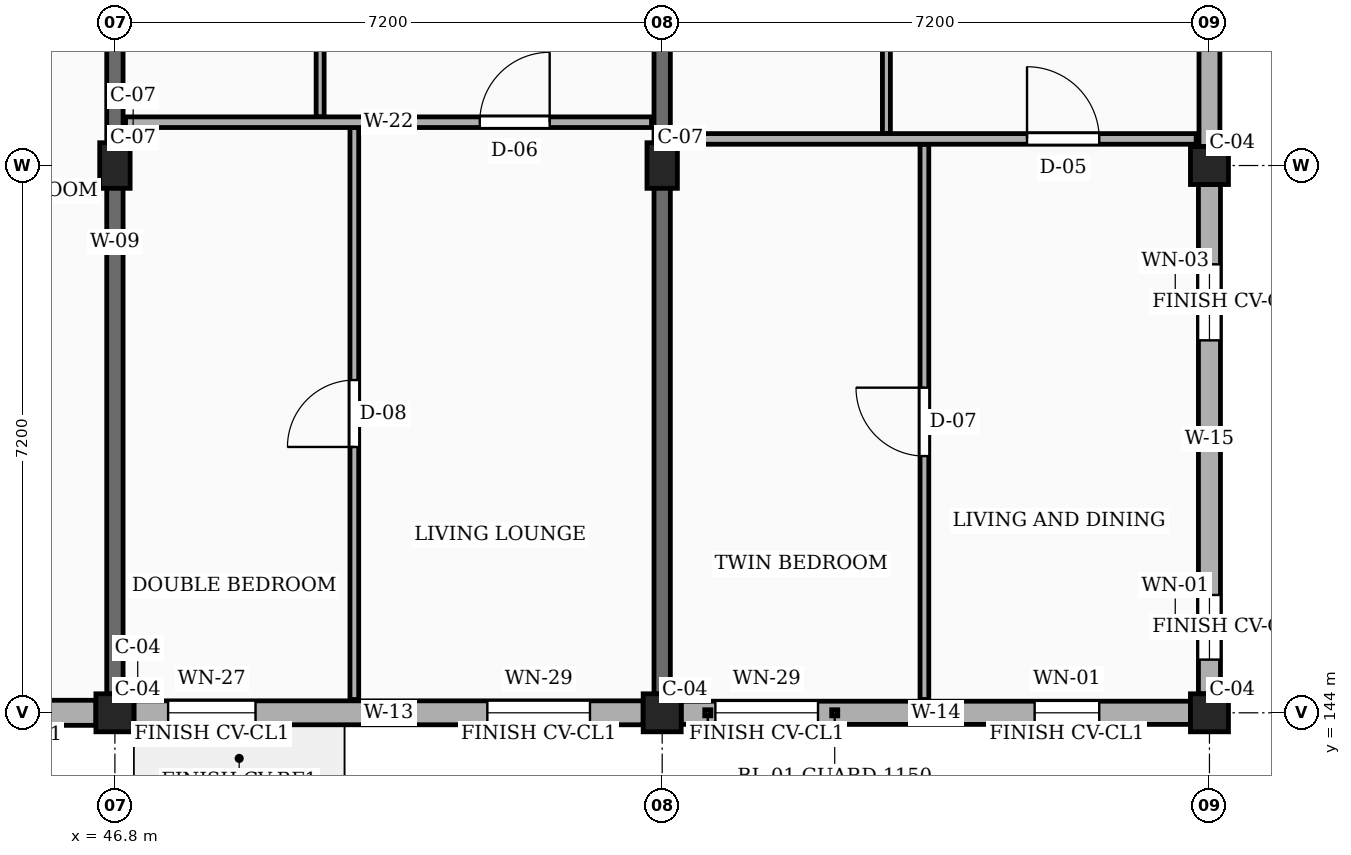
"""IFC4 building model, lengths in metres.
Left out: names, types, materials, properties, quantities, classifications, styles, units other than length and angle.
Written with IfcOpenShell. Run it as: python <this file> out.ifc"""

import sys

from ifc_helpers import new_model, si_unit, direction, frame, frame_2d, origin, origin_2d, place, context, subcontext, project, spatial, rectangle, extrude, element, fill, save


model = new_model("IFC4")
c1 = context("Model", 3, precision=1e-05, world=origin(), true_north=direction((0.0, 1.0)))
c2 = subcontext(c1, "Body", "Model", "MODEL_VIEW")
j1 = project(units=[si_unit("LENGTHUNIT", "METRE"), si_unit("PLANEANGLEUNIT", "RADIAN")], contexts=[c1])
p1 = place(None, origin())
s1 = spatial("IfcSite", under=j1, at=p1, CompositionType="ELEMENT")
p2 = place(p1, origin())
s2 = spatial("IfcBuilding", under=s1, at=p2, CompositionType="ELEMENT")
p3 = place(p2, frame((0.0, 0.0, 32.85)))
s3 = spatial("IfcBuildingStorey", under=s2, at=p3, CompositionType="ELEMENT", Elevation=32.85)
p4 = place(p3, frame((46.8, 144.0, 0.0), z_axis=(0.0, 0.0, 1.0), x_axis=(1.0, 0.0, 0.0)))
e1 = element("IfcColumn", 1, at=p4, inside=s3, PredefinedType="COLUMN", context=c2, shape_type="SweptSolid", body=[
    extrude(rectangle(XDim=0.5, YDim=0.5, at=origin_2d()), origin(), (0.0, 0.0, 1.0), 3.15),
])
p5 = place(p3, frame((46.8, 151.2, 0.0), z_axis=(0.0, 0.0, 1.0), x_axis=(1.0, 0.0, 0.0)))
e2 = element("IfcColumn", 2, at=p5, inside=s3, PredefinedType="COLUMN", context=c2, shape_type="SweptSolid", body=[
    extrude(rectangle(XDim=0.4, YDim=0.6, at=origin_2d()), origin(), (0.0, 0.0, 1.0), 3.15),
])
p6 = place(p3, frame((54.0, 144.0, 0.0), z_axis=(0.0, 0.0, 1.0), x_axis=(1.0, 0.0, 0.0)))
e3 = element("IfcColumn", 3, at=p6, inside=s3, PredefinedType="COLUMN", context=c2, shape_type="SweptSolid", body=[
    extrude(rectangle(XDim=0.5, YDim=0.5, at=origin_2d()), origin(), (0.0, 0.0, 1.0), 3.15),
])
p7 = place(p3, frame((54.0, 151.2, 0.0), z_axis=(0.0, 0.0, 1.0), x_axis=(1.0, 0.0, 0.0)))
e4 = element("IfcColumn", 4, at=p7, inside=s3, PredefinedType="COLUMN", context=c2, shape_type="SweptSolid", body=[
    extrude(rectangle(XDim=0.4, YDim=0.6, at=origin_2d()), origin(), (0.0, 0.0, 1.0), 3.15),
])
for number, where, z_axis, x_axis in (
    (5, (61.2, 144.0, 0.0), (0.0, 0.0, 1.0), (1.0, 0.0, 0.0)),
    (6, (61.2, 151.2, 0.0), (0.0, 0.0, 1.0), (1.0, 0.0, 0.0)),
):
    element("IfcColumn", number, at=place(p3, frame(where, z_axis=z_axis, x_axis=x_axis)), inside=s3, PredefinedType="COLUMN", context=c2, shape_type="SweptSolid", body=[
        extrude(rectangle(XDim=0.5, YDim=0.5, at=origin_2d()), origin(), (0.0, 0.0, 1.0), 3.15),
    ])
for number, where, z_axis, x_axis in (
    (7, (46.8, 144.25, 0.0), (0.0, 0.0, 1.0), (0.0, 1.0, 0.0)),
    (8, (54.0, 144.25, 0.0), (0.0, 0.0, 1.0), (0.0, 1.0, 0.0)),
):
    element("IfcWall", number, at=place(p3, frame(where, z_axis=z_axis, x_axis=x_axis)), inside=s3, PredefinedType="SOLIDWALL", context=c2, shape_type="SweptSolid", body=[
        extrude(rectangle(XDim=11.9, YDim=0.215, at=frame_2d((5.95, 0.0))), origin(), (0.0, 0.0, 1.0), 2.185),
    ])
p8 = place(p3, frame((39.85, 144.0, 0.0), z_axis=(0.0, 0.0, 1.0), x_axis=(1.0, 0.0, 0.0)))
e9 = element("IfcWall", 9, at=p8, inside=s3, PredefinedType="SOLIDWALL", context=c2, shape_type="SweptSolid", body=[
    extrude(rectangle(XDim=6.7, YDim=0.33, at=frame_2d((3.35, 0.0))), origin(), (0.0, 0.0, 1.0), 2.455),
])
p9 = place(p8, frame((0.45, 0.0, 0.78)))
e10 = element("IfcOpeningElement", 10, at=p9, cuts=e9, PredefinedType="OPENING", context=c2, shape_type="SweptSolid", body=[
    extrude(rectangle(XDim=0.94, YDim=1.44, at=frame_2d((0.47, 0.72))), frame((0.0, 0.175, 0.0), z_axis=(0.0, -1.0, 0.0), x_axis=(1.0, 0.0, 0.0)), (0.0, 0.0, 1.0), 0.35),
])
p10 = place(p8, frame((4.65, 0.0, 0.78)))
e11 = element("IfcOpeningElement", 11, at=p10, cuts=e9, PredefinedType="OPENING", context=c2, shape_type="SweptSolid", body=[
    extrude(rectangle(XDim=1.15, YDim=1.44, at=frame_2d((0.575, 0.72))), frame((0.0, 0.175, 0.0), z_axis=(0.0, -1.0, 0.0), x_axis=(1.0, 0.0, 0.0)), (0.0, 0.0, 1.0), 0.35),
])
p11 = place(p3, frame((47.05, 144.0, 0.0), z_axis=(0.0, 0.0, 1.0), x_axis=(1.0, 0.0, 0.0)))
e12 = element("IfcWall", 12, at=p11, inside=s3, PredefinedType="SOLIDWALL", context=c2, shape_type="SweptSolid", body=[
    extrude(rectangle(XDim=6.7, YDim=0.315, at=frame_2d((3.35, 0.0))), origin(), (0.0, 0.0, 1.0), 2.455),
])
p12 = place(p11, frame((0.45, 0.0, 0.78)))
e13 = element("IfcOpeningElement", 13, at=p12, cuts=e12, PredefinedType="OPENING", context=c2, shape_type="SweptSolid", body=[
    extrude(rectangle(XDim=1.15, YDim=1.44, at=frame_2d((0.575, 0.72))), frame((0.0, 0.167, 0.0), z_axis=(0.0, -1.0, 0.0), x_axis=(1.0, 0.0, 0.0)), (0.0, 0.0, 1.0), 0.335),
])
p13 = place(p11, frame((4.65, 0.0, 0.78)))
e14 = element("IfcOpeningElement", 14, at=p13, cuts=e12, PredefinedType="OPENING", context=c2, shape_type="SweptSolid", body=[
    extrude(rectangle(XDim=1.35, YDim=1.44, at=frame_2d((0.675, 0.72))), frame((0.0, 0.167, 0.0), z_axis=(0.0, -1.0, 0.0), x_axis=(1.0, 0.0, 0.0)), (0.0, 0.0, 1.0), 0.335),
])
p14 = place(p3, frame((54.25, 144.0, 0.0), z_axis=(0.0, 0.0, 1.0), x_axis=(1.0, 0.0, 0.0)))
e15 = element("IfcWall", 15, at=p14, inside=s3, PredefinedType="SOLIDWALL", context=c2, shape_type="SweptSolid", body=[
    extrude(rectangle(XDim=6.7, YDim=0.305, at=frame_2d((3.35, 0.0))), origin(), (0.0, 0.0, 1.0), 2.455),
])
p15 = place(p14, frame((0.45, 0.0, 0.78)))
e16 = element("IfcOpeningElement", 16, at=p15, cuts=e15, PredefinedType="OPENING", context=c2, shape_type="SweptSolid", body=[
    extrude(rectangle(XDim=1.35, YDim=1.44, at=frame_2d((0.675, 0.72))), frame((0.0, 0.163, 0.0), z_axis=(0.0, -1.0, 0.0), x_axis=(1.0, 0.0, 0.0)), (0.0, 0.0, 1.0), 0.325),
])
p16 = place(p14, frame((4.65, 0.0, 0.78)))
e17 = element("IfcOpeningElement", 17, at=p16, cuts=e15, PredefinedType="OPENING", context=c2, shape_type="SweptSolid", body=[
    extrude(rectangle(XDim=0.85, YDim=1.15, at=frame_2d((0.425, 0.575))), frame((0.0, 0.163, 0.0), z_axis=(0.0, -1.0, 0.0), x_axis=(1.0, 0.0, 0.0)), (0.0, 0.0, 1.0), 0.325),
])
p17 = place(p3, frame((61.2, 144.25, 0.0), z_axis=(0.0, 0.0, 1.0), x_axis=(0.0, 1.0, 0.0)))
e18 = element("IfcWall", 18, at=p17, inside=s3, PredefinedType="SOLIDWALL", context=c2, shape_type="SweptSolid", body=[
    extrude(rectangle(XDim=6.7, YDim=0.29, at=frame_2d((3.35, 0.0))), origin(), (0.0, 0.0, 1.0), 2.455),
])
p18 = place(p17, frame((0.45, 0.0, 0.78)))
e19 = element("IfcOpeningElement", 19, at=p18, cuts=e18, PredefinedType="OPENING", context=c2, shape_type="SweptSolid", body=[
    extrude(rectangle(XDim=0.85, YDim=1.15, at=frame_2d((0.425, 0.575))), frame((0.0, 0.155, 0.0), z_axis=(0.0, -1.0, 0.0), x_axis=(1.0, 0.0, 0.0)), (0.0, 0.0, 1.0), 0.31),
])
p19 = place(p17, frame((4.65, 0.0, 0.78)))
e20 = element("IfcOpeningElement", 20, at=p19, cuts=e18, PredefinedType="OPENING", context=c2, shape_type="SweptSolid", body=[
    extrude(rectangle(XDim=1.0, YDim=1.15, at=frame_2d((0.5, 0.575))), frame((0.0, 0.155, 0.0), z_axis=(0.0, -1.0, 0.0), x_axis=(1.0, 0.0, 0.0)), (0.0, 0.0, 1.0), 0.31),
])
p20 = place(p3, frame((61.2, 151.45, 0.0), z_axis=(0.0, 0.0, 1.0), x_axis=(0.0, 1.0, 0.0)))
e21 = element("IfcWall", 21, at=p20, inside=s3, PredefinedType="SOLIDWALL", context=c2, shape_type="SweptSolid", body=[
    extrude(rectangle(XDim=6.7, YDim=0.275, at=frame_2d((3.35, 0.0))), origin(), (0.0, 0.0, 1.0), 2.455),
])
p21 = place(p20, frame((1.995, 0.0, 0.78)))
e22 = element("IfcOpeningElement", 22, at=p21, cuts=e21, PredefinedType="OPENING", context=c2, shape_type="SweptSolid", body=[
    extrude(rectangle(XDim=1.0, YDim=1.15, at=frame_2d((0.5, 0.575))), frame((0.0, 0.147, 0.0), z_axis=(0.0, -1.0, 0.0), x_axis=(1.0, 0.0, 0.0)), (0.0, 0.0, 1.0), 0.295),
])
p22 = place(p20, frame((5.125, 0.0, 0.78)))
e23 = element("IfcOpeningElement", 23, at=p22, cuts=e21, PredefinedType="OPENING", context=c2, shape_type="SweptSolid", body=[
    extrude(rectangle(XDim=1.16, YDim=1.15, at=frame_2d((0.58, 0.575))), frame((0.0, 0.147, 0.0), z_axis=(0.0, -1.0, 0.0), x_axis=(1.0, 0.0, 0.0)), (0.0, 0.0, 1.0), 0.295),
])
p23 = place(p3, frame((49.95, 144.175, 0.0), z_axis=(0.0, 0.0, 1.0), x_axis=(0.0, 1.0, 0.0)))
e24 = element("IfcWall", 24, at=p23, inside=s3, PredefinedType="PARTITIONING", context=c2, shape_type="SweptSolid", body=[
    extrude(rectangle(XDim=7.525, YDim=0.115, at=frame_2d((3.762, 0.0))), origin(), (0.0, 0.0, 1.0), 2.32),
])
p24 = place(p23, frame((3.323, 0.0, 0.0)))
e25 = element("IfcOpeningElement", 25, at=p24, cuts=e24, PredefinedType="OPENING", context=c2, shape_type="SweptSolid", body=[
    extrude(rectangle(XDim=0.88, YDim=2.08, at=frame_2d((0.44, 1.04))), frame((0.0, 0.067, 0.0), z_axis=(0.0, -1.0, 0.0), x_axis=(1.0, 0.0, 0.0)), (0.0, 0.0, 1.0), 0.135),
])
p25 = place(p3, frame((49.5, 151.84, 0.0), z_axis=(0.0, 0.0, 1.0), x_axis=(0.0, 1.0, 0.0)))
e26 = element("IfcWall", 26, at=p25, inside=s3, PredefinedType="PARTITIONING", context=c2, shape_type="SweptSolid", body=[
    extrude(rectangle(XDim=4.37, YDim=0.105, at=frame_2d((2.185, 0.0))), origin(), (0.0, 0.0, 1.0), 2.32),
])
p26 = place(p25, frame((1.75, 0.0, 0.0)))
e27 = element("IfcOpeningElement", 27, at=p26, cuts=e26, PredefinedType="OPENING", context=c2, shape_type="SweptSolid", body=[
    extrude(rectangle(XDim=0.87, YDim=2.05, at=frame_2d((0.435, 1.025))), frame((0.0, 0.062, 0.0), z_axis=(0.0, -1.0, 0.0), x_axis=(1.0, 0.0, 0.0)), (0.0, 0.0, 1.0), 0.125),
])
p27 = place(p3, frame((46.94, 151.77, 0.0), z_axis=(0.0, 0.0, 1.0), x_axis=(1.0, 0.0, 0.0)))
e28 = element("IfcWall", 28, at=p27, inside=s3, PredefinedType="PARTITIONING", context=c2, shape_type="SweptSolid", body=[
    extrude(rectangle(XDim=6.92, YDim=0.14, at=frame_2d((3.46, 0.0))), origin(), (0.0, 0.0, 1.0), 2.32),
])
p28 = place(p27, frame((4.66, 0.0, 0.0)))
e29 = element("IfcOpeningElement", 29, at=p28, cuts=e28, PredefinedType="OPENING", context=c2, shape_type="SweptSolid", body=[
    extrude(rectangle(XDim=0.92, YDim=2.1, at=frame_2d((0.46, 1.05))), frame((0.0, 0.08, 0.0), z_axis=(0.0, -1.0, 0.0), x_axis=(1.0, 0.0, 0.0)), (0.0, 0.0, 1.0), 0.16),
])
p29 = place(p3, frame((57.45, 144.175, 0.0), z_axis=(0.0, 0.0, 1.0), x_axis=(0.0, 1.0, 0.0)))
e30 = element("IfcWall", 30, at=p29, inside=s3, PredefinedType="PARTITIONING", context=c2, shape_type="SweptSolid", body=[
    extrude(rectangle(XDim=7.305, YDim=0.115, at=frame_2d((3.652, 0.0))), origin(), (0.0, 0.0, 1.0), 2.32),
])
p30 = place(p29, frame((3.202, 0.0, 0.0)))
e31 = element("IfcOpeningElement", 31, at=p30, cuts=e30, PredefinedType="OPENING", context=c2, shape_type="SweptSolid", body=[
    extrude(rectangle(XDim=0.9, YDim=2.1, at=frame_2d((0.45, 1.05))), frame((0.0, 0.067, 0.0), z_axis=(0.0, -1.0, 0.0), x_axis=(1.0, 0.0, 0.0)), (0.0, 0.0, 1.0), 0.135),
])
p31 = place(p3, frame((56.95, 151.62, 0.0), z_axis=(0.0, 0.0, 1.0), x_axis=(0.0, 1.0, 0.0)))
e32 = element("IfcWall", 32, at=p31, inside=s3, PredefinedType="PARTITIONING", context=c2, shape_type="SweptSolid", body=[
    extrude(rectangle(XDim=4.59, YDim=0.105, at=frame_2d((2.295, 0.0))), origin(), (0.0, 0.0, 1.0), 2.32),
])
p32 = place(p31, frame((1.845, 0.0, 0.0)))
e33 = element("IfcOpeningElement", 33, at=p32, cuts=e32, PredefinedType="OPENING", context=c2, shape_type="SweptSolid", body=[
    extrude(rectangle(XDim=0.9, YDim=2.05, at=frame_2d((0.45, 1.025))), frame((0.0, 0.062, 0.0), z_axis=(0.0, -1.0, 0.0), x_axis=(1.0, 0.0, 0.0)), (0.0, 0.0, 1.0), 0.125),
])
p33 = place(p3, frame((54.14, 151.55, 0.0), z_axis=(0.0, 0.0, 1.0), x_axis=(1.0, 0.0, 0.0)))
e34 = element("IfcWall", 34, at=p33, inside=s3, PredefinedType="PARTITIONING", context=c2, shape_type="SweptSolid", body=[
    extrude(rectangle(XDim=6.885, YDim=0.14, at=frame_2d((3.442, 0.0))), origin(), (0.0, 0.0, 1.0), 2.32),
])
p34 = place(p33, frame((4.66, 0.0, 0.0)))
e35 = element("IfcOpeningElement", 35, at=p34, cuts=e34, PredefinedType="OPENING", context=c2, shape_type="SweptSolid", body=[
    extrude(rectangle(XDim=0.95, YDim=2.1, at=frame_2d((0.475, 1.05))), frame((0.0, 0.08, 0.0), z_axis=(0.0, -1.0, 0.0), x_axis=(1.0, 0.0, 0.0)), (0.0, 0.0, 1.0), 0.16),
])
p35 = place(p12, origin())
e36 = element("IfcWindow", 36, at=p35, inside=s3, PartitioningType="SINGLE_PANEL", PredefinedType="WINDOW", context=c2, shape_type="SweptSolid", body=[
    extrude(rectangle(XDim=1.15, YDim=1.44, at=frame_2d((0.575, 0.72))), frame((0.0, 0.03, 0.0), z_axis=(0.0, -1.0, 0.0), x_axis=(1.0, 0.0, 0.0)), (0.0, 0.0, 1.0), 0.06),
])
fill(e13, e36)
p36 = place(p13, origin())
e37 = element("IfcWindow", 37, at=p36, inside=s3, PartitioningType="SINGLE_PANEL", PredefinedType="WINDOW", context=c2, shape_type="SweptSolid", body=[
    extrude(rectangle(XDim=1.35, YDim=1.44, at=frame_2d((0.675, 0.72))), frame((0.0, 0.03, 0.0), z_axis=(0.0, -1.0, 0.0), x_axis=(1.0, 0.0, 0.0)), (0.0, 0.0, 1.0), 0.06),
])
fill(e14, e37)
p37 = place(p15, origin())
e38 = element("IfcWindow", 38, at=p37, inside=s3, PartitioningType="SINGLE_PANEL", PredefinedType="WINDOW", context=c2, shape_type="SweptSolid", body=[
    extrude(rectangle(XDim=1.35, YDim=1.44, at=frame_2d((0.675, 0.72))), frame((0.0, 0.03, 0.0), z_axis=(0.0, -1.0, 0.0), x_axis=(1.0, 0.0, 0.0)), (0.0, 0.0, 1.0), 0.06),
])
fill(e16, e38)
p38 = place(p16, origin())
e39 = element("IfcWindow", 39, at=p38, inside=s3, PartitioningType="SINGLE_PANEL", PredefinedType="WINDOW", context=c2, shape_type="SweptSolid", body=[
    extrude(rectangle(XDim=0.85, YDim=1.15, at=frame_2d((0.425, 0.575))), frame((0.0, 0.03, 0.0), z_axis=(0.0, -1.0, 0.0), x_axis=(1.0, 0.0, 0.0)), (0.0, 0.0, 1.0), 0.06),
])
fill(e17, e39)
p39 = place(p18, origin())
e40 = element("IfcWindow", 40, at=p39, inside=s3, PartitioningType="SINGLE_PANEL", PredefinedType="WINDOW", context=c2, shape_type="SweptSolid", body=[
    extrude(rectangle(XDim=0.85, YDim=1.15, at=frame_2d((0.425, 0.575))), frame((0.0, 0.03, 0.0), z_axis=(0.0, -1.0, 0.0), x_axis=(1.0, 0.0, 0.0)), (0.0, 0.0, 1.0), 0.06),
])
fill(e19, e40)
p40 = place(p19, origin())
e41 = element("IfcWindow", 41, at=p40, inside=s3, PartitioningType="SINGLE_PANEL", PredefinedType="WINDOW", context=c2, shape_type="SweptSolid", body=[
    extrude(rectangle(XDim=1.0, YDim=1.15, at=frame_2d((0.5, 0.575))), frame((0.0, 0.03, 0.0), z_axis=(0.0, -1.0, 0.0), x_axis=(1.0, 0.0, 0.0)), (0.0, 0.0, 1.0), 0.06),
])
fill(e20, e41)
p41 = place(p24, origin())
e42 = element("IfcDoor", 42, at=p41, inside=s3, OperationType="SINGLE_SWING_LEFT", PredefinedType="DOOR", context=c2, shape_type="SweptSolid", body=[
    extrude(rectangle(XDim=0.88, YDim=2.08, at=frame_2d((0.44, 1.04))), frame((0.0, 0.025, 0.0), z_axis=(0.0, -1.0, 0.0), x_axis=(1.0, 0.0, 0.0)), (0.0, 0.0, 1.0), 0.05),
])
fill(e25, e42)
p42 = place(p28, origin())
e43 = element("IfcDoor", 43, at=p42, inside=s3, OperationType="SINGLE_SWING_RIGHT", PredefinedType="DOOR", context=c2, shape_type="SweptSolid", body=[
    extrude(rectangle(XDim=0.92, YDim=2.1, at=frame_2d((0.46, 1.05))), frame((0.0, 0.025, 0.0), z_axis=(0.0, -1.0, 0.0), x_axis=(1.0, 0.0, 0.0)), (0.0, 0.0, 1.0), 0.05),
])
fill(e29, e43)
p43 = place(p30, origin())
e44 = element("IfcDoor", 44, at=p43, inside=s3, OperationType="SINGLE_SWING_RIGHT", PredefinedType="DOOR", context=c2, shape_type="SweptSolid", body=[
    extrude(rectangle(XDim=0.9, YDim=2.1, at=frame_2d((0.45, 1.05))), frame((0.0, 0.025, 0.0), z_axis=(0.0, -1.0, 0.0), x_axis=(1.0, 0.0, 0.0)), (0.0, 0.0, 1.0), 0.05),
])
fill(e31, e44)
p44 = place(p34, origin())
e45 = element("IfcDoor", 45, at=p44, inside=s3, OperationType="SINGLE_SWING_LEFT", PredefinedType="DOOR", context=c2, shape_type="SweptSolid", body=[
    extrude(rectangle(XDim=0.95, YDim=2.1, at=frame_2d((0.475, 1.05))), frame((0.0, 0.025, 0.0), z_axis=(0.0, -1.0, 0.0), x_axis=(1.0, 0.0, 0.0)), (0.0, 0.0, 1.0), 0.05),
])
fill(e35, e45)
save(model, sys.argv[1])
